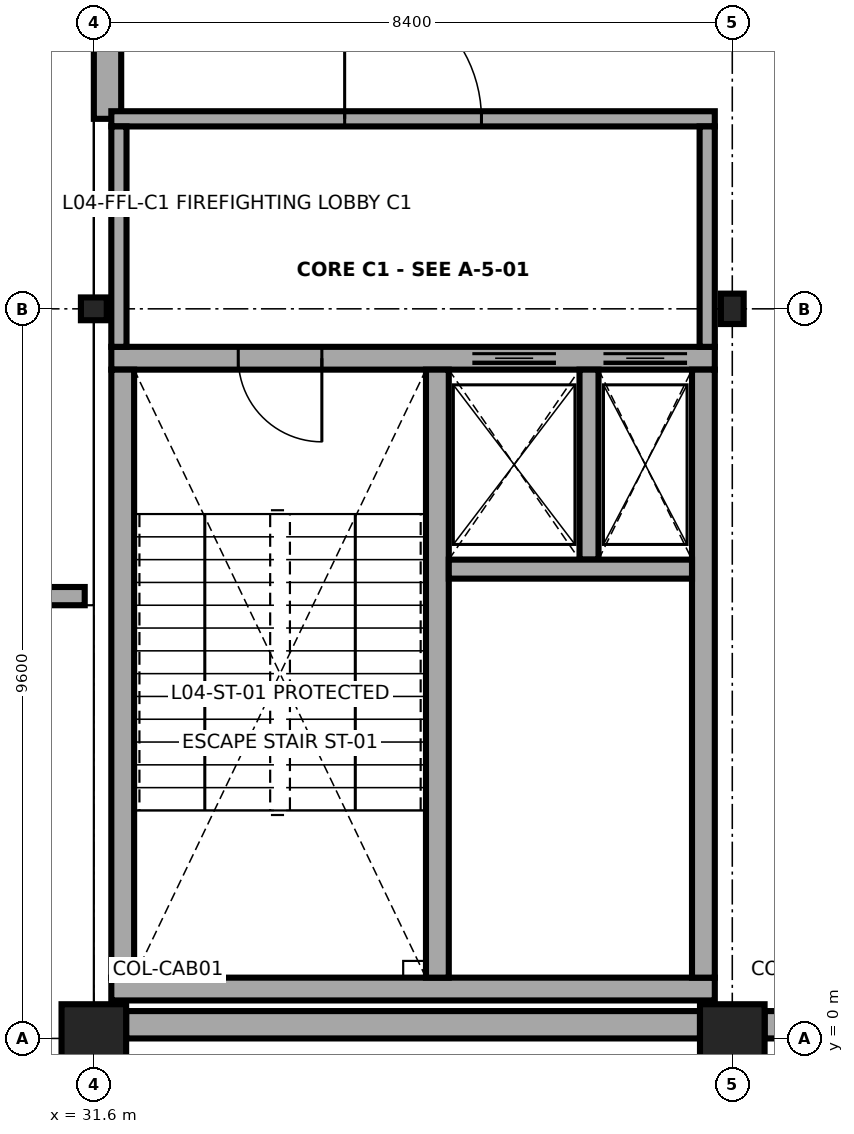
"""IFC4 building model, lengths in metres.
Left out: names, types, materials, properties, quantities, classifications, styles, units other than length and angle.
Written with IfcOpenShell. Run it as: python <this file> out.ifc"""

import sys

from ifc_helpers import new_model, si_unit, direction, frame, frame_2d, origin, origin_2d, place, context, subcontext, project, spatial, rectangle, i_section, extrude, element, fill, save


model = new_model("IFC4")
c1 = context("Model", 3, precision=1e-05, world=origin(), true_north=direction((0.0, 1.0)))
c2 = subcontext(c1, "Body", "Model", "MODEL_VIEW")
j1 = project(units=[si_unit("LENGTHUNIT", "METRE"), si_unit("PLANEANGLEUNIT", "RADIAN")], contexts=[c1])
p1 = place(None, origin())
s1 = spatial("IfcSite", under=j1, at=p1, CompositionType="ELEMENT")
p2 = place(p1, origin())
s2 = spatial("IfcBuilding", under=s1, at=p2, CompositionType="ELEMENT")
p3 = place(p2, frame((0.0, 0.0, 21.9)))
s3 = spatial("IfcBuildingStorey", under=s2, at=p3, CompositionType="ELEMENT", Elevation=21.9)
p4 = place(p3, frame((31.6, 0.0, 0.0), z_axis=(0.0, 0.0, 1.0), x_axis=(1.0, 0.0, 0.0)))
e1 = element("IfcColumn", 1, at=p4, inside=s3, PredefinedType="COLUMN", context=c2, shape_type="SweptSolid", body=[
    extrude(rectangle(XDim=0.85, YDim=0.9, at=origin_2d()), origin(), (0.0, 0.0, 1.0), 4.5),
])
p5 = place(p3, frame((31.6, 9.6, 0.0), z_axis=(0.0, 0.0, 1.0), x_axis=(0.0, 1.0, 0.0)))
e2 = element("IfcColumn", 2, at=p5, inside=s3, PredefinedType="COLUMN", context=c2, shape_type="SweptSolid", body=[
    extrude(i_section(OverallWidth=0.3, OverallDepth=0.34, WebThickness=0.012, FlangeThickness=0.021, FilletRadius=0.027, at=origin_2d()), origin(), (0.0, 0.0, 1.0), 4.5),
])
p6 = place(p3, frame((40.0, 0.0, 0.0), z_axis=(0.0, 0.0, 1.0), x_axis=(1.0, 0.0, 0.0)))
e3 = element("IfcColumn", 3, at=p6, inside=s3, PredefinedType="COLUMN", context=c2, shape_type="SweptSolid", body=[
    extrude(rectangle(XDim=0.85, YDim=0.9, at=origin_2d()), origin(), (0.0, 0.0, 1.0), 4.5),
])
p7 = place(p3, frame((40.0, 9.6, 0.0), z_axis=(0.0, 0.0, 1.0), x_axis=(1.0, 0.0, 0.0)))
e4 = element("IfcColumn", 4, at=p7, inside=s3, PredefinedType="COLUMN", context=c2, shape_type="SweptSolid", body=[
    extrude(i_section(OverallWidth=0.3, OverallDepth=0.4, WebThickness=0.013, FlangeThickness=0.024, FilletRadius=0.027, at=origin_2d()), origin(), (0.0, 0.0, 1.0), 4.5),
])
p8 = place(p3, frame((32.025, 0.18, 0.0), z_axis=(0.0, 0.0, 1.0), x_axis=(1.0, 0.0, 0.0)))
e5 = element("IfcWall", 5, at=p8, inside=s3, PredefinedType="SOLIDWALL", context=c2, shape_type="SweptSolid", body=[
    extrude(rectangle(XDim=7.55, YDim=0.36, at=frame_2d((3.775, 0.0))), origin(), (0.0, 0.0, 1.0), 3.335),
])
p9 = place(p3, frame((40.425, 0.18, 0.0), z_axis=(0.0, 0.0, 1.0), x_axis=(1.0, 0.0, 0.0)))
e6 = element("IfcWall", 6, at=p9, inside=s3, PredefinedType="SOLIDWALL", context=c2, shape_type="SweptSolid", body=[
    extrude(rectangle(XDim=0.575, YDim=0.36, at=frame_2d((0.288, 0.0))), origin(), (0.0, 0.0, 1.0), 3.335),
])
p10 = place(p3, frame((6.52, 5.82, 0.0), z_axis=(0.0, 0.0, 1.0), x_axis=(1.0, 0.0, 0.0)))
e7 = element("IfcWall", 7, at=p10, inside=s3, PredefinedType="PARAPET", context=c2, shape_type="SweptSolid", body=[
    extrude(rectangle(XDim=24.96, YDim=0.24, at=frame_2d((12.48, 0.0))), origin(), (0.0, 0.0, 1.0), 0.95),
])
p11 = place(p3, frame((31.78, 18.75, 0.0), z_axis=(0.0, 0.0, 1.0), x_axis=(0.0, -1.0, 0.0)))
e8 = element("IfcWall", 8, at=p11, inside=s3, PredefinedType="SOLIDWALL", context=c2, shape_type="SweptSolid", body=[
    extrude(rectangle(XDim=6.65, YDim=0.36, at=frame_2d((3.325, 0.0))), origin(), (0.0, 0.0, 1.0), 3.332),
])
p12 = place(p3, frame((31.83, 0.65, 0.0), z_axis=(0.0, 0.0, 1.0), x_axis=(1.0, 0.0, 0.0)))
e9 = element("IfcWall", 9, at=p12, inside=s3, PredefinedType="SHEAR", context=c2, shape_type="SweptSolid", body=[
    extrude(rectangle(XDim=7.94, YDim=0.3, at=frame_2d((3.97, 0.0))), origin(), (0.0, 0.0, 1.0), 4.25),
])
p13 = place(p3, frame((39.77, 8.95, 0.0), z_axis=(0.0, 0.0, 1.0), x_axis=(-1.0, 0.0, 0.0)))
e10 = element("IfcWall", 10, at=p13, inside=s3, PredefinedType="SHEAR", context=c2, shape_type="SweptSolid", body=[
    extrude(rectangle(XDim=7.94, YDim=0.3, at=frame_2d((3.97, 0.0))), origin(), (0.0, 0.0, 1.0), 4.25),
])
p14 = place(p13, frame((5.17, 0.0, 0.0)))
e11 = element("IfcOpeningElement", 11, at=p14, cuts=e10, PredefinedType="OPENING", context=c2, shape_type="SweptSolid", body=[
    extrude(rectangle(XDim=1.1, YDim=2.2, at=frame_2d((0.55, 1.1))), frame((0.0, 0.16, 0.0), z_axis=(0.0, -1.0, 0.0), x_axis=(1.0, 0.0, 0.0)), (0.0, 0.0, 1.0), 0.32),
])
p15 = place(p13, frame((2.09, 0.0, 0.0)))
e12 = element("IfcOpeningElement", 12, at=p15, cuts=e10, PredefinedType="OPENING", context=c2, shape_type="SweptSolid", body=[
    extrude(rectangle(XDim=1.1, YDim=2.1, at=frame_2d((0.55, 1.05))), frame((0.0, 0.16, 0.0), z_axis=(0.0, -1.0, 0.0), x_axis=(1.0, 0.0, 0.0)), (0.0, 0.0, 1.0), 0.32),
])
p16 = place(p13, frame((0.365, 0.0, 0.0)))
e13 = element("IfcOpeningElement", 13, at=p16, cuts=e10, PredefinedType="OPENING", context=c2, shape_type="SweptSolid", body=[
    extrude(rectangle(XDim=1.1, YDim=2.1, at=frame_2d((0.55, 1.05))), frame((0.0, 0.16, 0.0), z_axis=(0.0, -1.0, 0.0), x_axis=(1.0, 0.0, 0.0)), (0.0, 0.0, 1.0), 0.32),
])
for number, where, z_axis, x_axis in (
    (14, (31.98, 8.8, 0.0), (0.0, 0.0, 1.0), (0.0, -1.0, 0.0)),
    (15, (39.62, 0.8, 0.0), (0.0, 0.0, 1.0), (0.0, 1.0, 0.0)),
    (16, (36.12, 0.8, 0.0), (0.0, 0.0, 1.0), (0.0, 1.0, 0.0)),
):
    element("IfcWall", number, at=place(p3, frame(where, z_axis=z_axis, x_axis=x_axis)), inside=s3, PredefinedType="SHEAR", context=c2, shape_type="SweptSolid", body=[
        extrude(rectangle(XDim=8.0, YDim=0.3, at=frame_2d((4.0, 0.0))), origin(), (0.0, 0.0, 1.0), 4.25),
    ])
p17 = place(p3, frame((38.115, 6.3, 0.0), z_axis=(0.0, 0.0, 1.0), x_axis=(0.0, 1.0, 0.0)))
e17 = element("IfcWall", 17, at=p17, inside=s3, PredefinedType="SHEAR", context=c2, shape_type="SweptSolid", body=[
    extrude(rectangle(XDim=2.5, YDim=0.25, at=frame_2d((1.25, 0.0))), origin(), (0.0, 0.0, 1.0), 4.25),
])
p18 = place(p3, frame((36.27, 6.175, 0.0), z_axis=(0.0, 0.0, 1.0), x_axis=(1.0, 0.0, 0.0)))
e18 = element("IfcWall", 18, at=p18, inside=s3, PredefinedType="SHEAR", context=c2, shape_type="SweptSolid", body=[
    extrude(rectangle(XDim=3.2, YDim=0.25, at=frame_2d((1.6, 0.0))), origin(), (0.0, 0.0, 1.0), 4.25),
])
p19 = place(p3, frame((31.83, 12.1, 0.0), z_axis=(0.0, 0.0, 1.0), x_axis=(1.0, 0.0, 0.0)))
e19 = element("IfcWall", 19, at=p19, inside=s3, PredefinedType="SOLIDWALL", context=c2, shape_type="SweptSolid", body=[
    extrude(rectangle(XDim=7.94, YDim=0.2, at=frame_2d((3.97, 0.0))), origin(), (0.0, 0.0, 1.0), 3.902),
])
p20 = place(p19, frame((3.07, 0.0, 0.0)))
e20 = element("IfcOpeningElement", 20, at=p20, cuts=e19, PredefinedType="OPENING", context=c2, shape_type="SweptSolid", body=[
    extrude(rectangle(XDim=1.8, YDim=2.2, at=frame_2d((0.9, 1.1))), frame((0.0, 0.11, 0.0), z_axis=(0.0, -1.0, 0.0), x_axis=(1.0, 0.0, 0.0)), (0.0, 0.0, 1.0), 0.22),
])
for number, where, z_axis, x_axis in (
    (21, (31.93, 9.1, 0.0), (0.0, 0.0, 1.0), (0.0, 1.0, 0.0)),
    (22, (39.67, 12.0, 0.0), (0.0, 0.0, 1.0), (0.0, -1.0, 0.0)),
):
    element("IfcWall", number, at=place(p3, frame(where, z_axis=z_axis, x_axis=x_axis)), inside=s3, PredefinedType="SOLIDWALL", context=c2, shape_type="SweptSolid", body=[
        extrude(rectangle(XDim=2.9, YDim=0.2, at=frame_2d((1.45, 0.0))), origin(), (0.0, 0.0, 1.0), 3.942),
    ])
p21 = place(p14, origin())
e23 = element("IfcDoor", 23, at=p21, inside=s3, OperationType="SINGLE_SWING_LEFT", PredefinedType="DOOR", context=c2, shape_type="SweptSolid", body=[
    extrude(rectangle(XDim=1.1, YDim=2.2, at=frame_2d((0.55, 1.1))), frame((0.0, 0.025, 0.0), z_axis=(0.0, -1.0, 0.0), x_axis=(1.0, 0.0, 0.0)), (0.0, 0.0, 1.0), 0.05),
])
fill(e11, e23)
p22 = place(p15, origin())
e24 = element("IfcDoor", 24, at=p22, inside=s3, OperationType="SLIDING_TO_LEFT", PredefinedType="DOOR", context=c2, shape_type="SweptSolid", body=[
    extrude(rectangle(XDim=1.1, YDim=2.1, at=frame_2d((0.55, 1.05))), frame((0.0, 0.025, 0.0), z_axis=(0.0, -1.0, 0.0), x_axis=(1.0, 0.0, 0.0)), (0.0, 0.0, 1.0), 0.05),
])
fill(e12, e24)
p23 = place(p16, origin())
e25 = element("IfcDoor", 25, at=p23, inside=s3, OperationType="SLIDING_TO_LEFT", PredefinedType="DOOR", context=c2, shape_type="SweptSolid", body=[
    extrude(rectangle(XDim=1.1, YDim=2.1, at=frame_2d((0.55, 1.05))), frame((0.0, 0.025, 0.0), z_axis=(0.0, -1.0, 0.0), x_axis=(1.0, 0.0, 0.0)), (0.0, 0.0, 1.0), 0.05),
])
fill(e13, e25)
p24 = place(p20, origin())
e26 = element("IfcDoor", 26, at=p24, inside=s3, OperationType="DOUBLE_DOOR_SINGLE_SWING", PredefinedType="DOOR", context=c2, shape_type="SweptSolid", body=[
    extrude(rectangle(XDim=1.8, YDim=2.2, at=frame_2d((0.9, 1.1))), frame((0.0, 0.025, 0.0), z_axis=(0.0, -1.0, 0.0), x_axis=(1.0, 0.0, 0.0)), (0.0, 0.0, 1.0), 0.05),
])
fill(e20, e26)
save(model, sys.argv[1])
